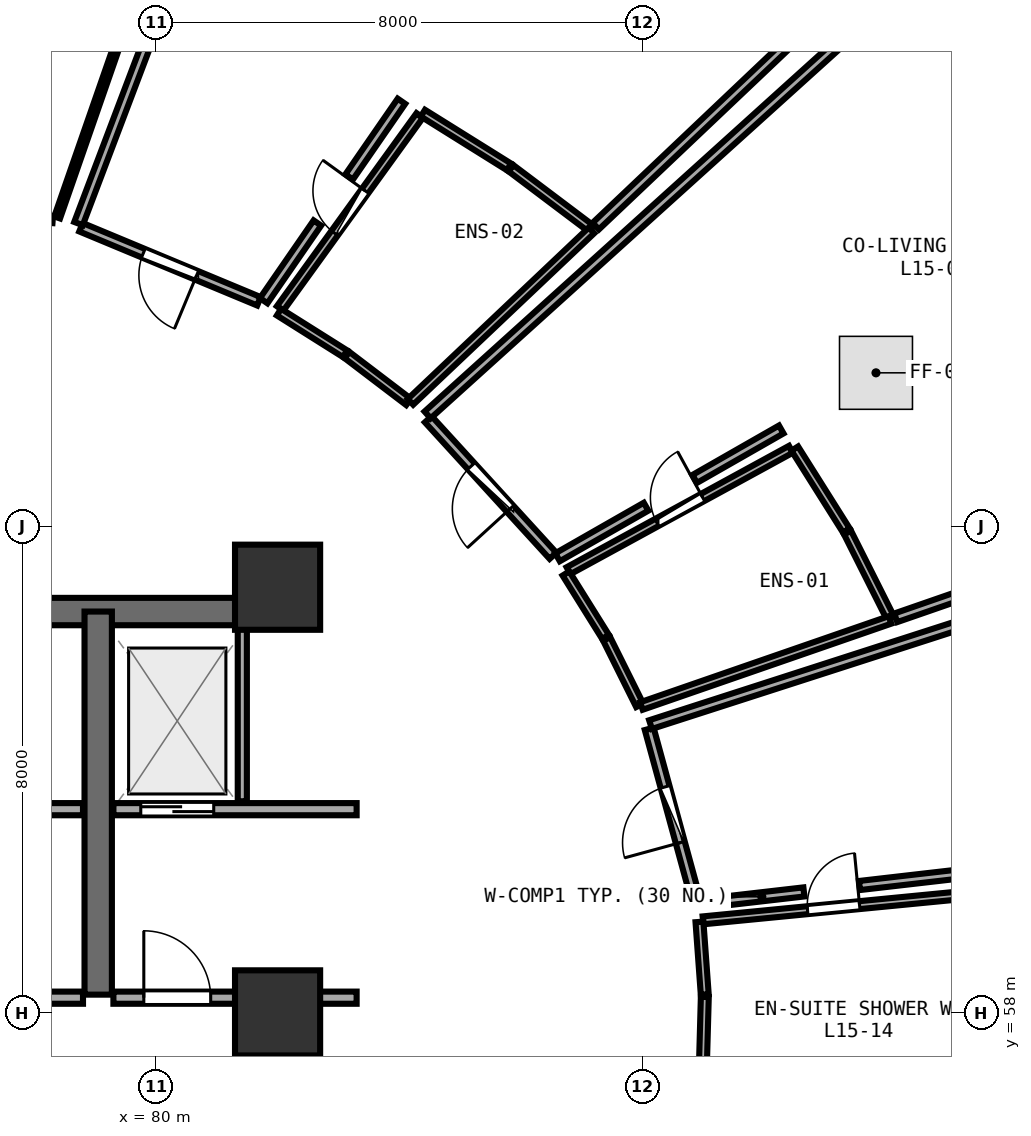
"""IFC4 building model, lengths in metres.
Left out: names, types, materials, properties, quantities, classifications, styles, units other than length and angle.
Written with IfcOpenShell. Run it as: python <this file> out.ifc"""

import sys

from ifc_helpers import new_model, si_unit, direction, frame, frame_2d, origin, origin_2d, place, context, subcontext, project, spatial, rectangle, extrude, element, fill, save


model = new_model("IFC4")
c1 = context("Model", 3, precision=1e-05, world=origin(), true_north=direction((0.0, 1.0)))
c2 = subcontext(c1, "Body", "Model", "MODEL_VIEW")
j1 = project(units=[si_unit("LENGTHUNIT", "METRE"), si_unit("PLANEANGLEUNIT", "RADIAN")], contexts=[c1])
p1 = place(None, origin())
s1 = spatial("IfcSite", under=j1, at=p1, CompositionType="ELEMENT")
p2 = place(p1, origin())
s2 = spatial("IfcBuilding", under=s1, at=p2, CompositionType="ELEMENT")
p3 = place(p2, frame((0.0, 0.0, 60.0)))
s3 = spatial("IfcBuildingStorey", under=s2, at=p3, CompositionType="ELEMENT", Elevation=60.0)
for number, where, z_axis, x_axis in (
    (1, (82.0, 58.0, 0.0), (0.0, 0.0, 1.0), (1.0, 0.0, 0.0)),
    (2, (82.0, 65.0, 0.0), (0.0, 0.0, 1.0), (1.0, 0.0, 0.0)),
):
    element("IfcColumn", number, at=place(p3, frame(where, z_axis=z_axis, x_axis=x_axis)), inside=s3, PredefinedType="PILASTER", context=c2, shape_type="SweptSolid", body=[
        extrude(rectangle(XDim=1.4, YDim=1.4, at=origin_2d()), origin(), (0.0, 0.0, 1.0), 3.75),
    ])
p4 = place(p3, frame((74.0, 64.6, 0.0), z_axis=(0.0, 0.0, 1.0), x_axis=(1.0, 0.0, 0.0)))
e3 = element("IfcWall", 3, at=p4, inside=s3, PredefinedType="SHEAR", context=c2, shape_type="SweptSolid", body=[
    extrude(rectangle(XDim=8.0, YDim=0.45, at=frame_2d((4.0, 0.0))), origin(), (0.0, 0.0, 1.0), 3.49),
])
p5 = place(p3, frame((79.05, 58.3, 0.0), z_axis=(0.0, 0.0, 1.0), x_axis=(0.0, 1.0, 0.0)))
e4 = element("IfcWall", 4, at=p5, inside=s3, PredefinedType="SHEAR", context=c2, shape_type="SweptSolid", body=[
    extrude(rectangle(XDim=6.3, YDim=0.45, at=frame_2d((3.15, 0.0))), origin(), (0.0, 0.0, 1.0), 3.49),
])
p6 = place(p3, frame((74.2, 61.35, 0.0), z_axis=(0.0, 0.0, 1.0), x_axis=(1.0, 0.0, 0.0)))
e5 = element("IfcWall", 5, at=p6, inside=s3, PredefinedType="SOLIDWALL", context=c2, shape_type="SweptSolid", body=[
    extrude(rectangle(XDim=4.6, YDim=0.2, at=frame_2d((2.3, 0.0))), origin(), (0.0, 0.0, 1.0), 3.48),
])
p7 = place(p6, frame((0.52, 0.0, 0.0)))
e6 = element("IfcOpeningElement", 6, at=p7, cuts=e5, PredefinedType="OPENING", context=c2, shape_type="SweptSolid", body=[
    extrude(rectangle(XDim=1.2, YDim=2.15, at=frame_2d((0.6, 1.075))), frame((0.0, 0.11, 0.0), z_axis=(0.0, -1.0, 0.0), x_axis=(1.0, 0.0, 0.0)), (0.0, 0.0, 1.0), 0.22),
])
p8 = place(p3, frame((79.3, 61.35, 0.0), z_axis=(0.0, 0.0, 1.0), x_axis=(1.0, 0.0, 0.0)))
e7 = element("IfcWall", 7, at=p8, inside=s3, PredefinedType="SOLIDWALL", context=c2, shape_type="SweptSolid", body=[
    extrude(rectangle(XDim=4.0, YDim=0.2, at=frame_2d((2.0, 0.0))), origin(), (0.0, 0.0, 1.0), 2.775),
])
p9 = place(p8, frame((0.45, 0.0, 0.0)))
e8 = element("IfcOpeningElement", 8, at=p9, cuts=e7, PredefinedType="OPENING", context=c2, shape_type="SweptSolid", body=[
    extrude(rectangle(XDim=1.2, YDim=2.15, at=frame_2d((0.6, 1.075))), frame((0.0, 0.11, 0.0), z_axis=(0.0, -1.0, 0.0), x_axis=(1.0, 0.0, 0.0)), (0.0, 0.0, 1.0), 0.22),
])
p10 = place(p3, frame((81.42, 61.48, 0.0), z_axis=(0.0, 0.0, 1.0), x_axis=(0.0, 1.0, 0.0)))
e9 = element("IfcWall", 9, at=p10, inside=s3, PredefinedType="PARTITIONING", context=c2, shape_type="SweptSolid", body=[
    extrude(rectangle(XDim=2.84, YDim=0.15, at=frame_2d((1.42, 0.0))), origin(), (0.0, 0.0, 1.0), 3.48),
])
p11 = place(p3, frame((74.2, 58.25, 0.0), z_axis=(0.0, 0.0, 1.0), x_axis=(1.0, 0.0, 0.0)))
e10 = element("IfcWall", 10, at=p11, inside=s3, PredefinedType="SOLIDWALL", context=c2, shape_type="SweptSolid", body=[
    extrude(rectangle(XDim=4.6, YDim=0.2, at=frame_2d((2.3, 0.0))), origin(), (0.0, 0.0, 1.0), 3.48),
])
p12 = place(p11, frame((1.8, 0.0, 0.0)))
e11 = element("IfcOpeningElement", 11, at=p12, cuts=e10, PredefinedType="OPENING", context=c2, shape_type="SweptSolid", body=[
    extrude(rectangle(XDim=1.1, YDim=2.1, at=frame_2d((0.55, 1.05))), frame((0.0, 0.11, 0.0), z_axis=(0.0, -1.0, 0.0), x_axis=(1.0, 0.0, 0.0)), (0.0, 0.0, 1.0), 0.22),
])
p13 = place(p3, frame((79.3, 58.25, 0.0), z_axis=(0.0, 0.0, 1.0), x_axis=(1.0, 0.0, 0.0)))
e12 = element("IfcWall", 12, at=p13, inside=s3, PredefinedType="SOLIDWALL", context=c2, shape_type="SweptSolid", body=[
    extrude(rectangle(XDim=4.0, YDim=0.2, at=frame_2d((2.0, 0.0))), origin(), (0.0, 0.0, 1.0), 2.775),
])
p14 = place(p13, frame((0.5, 0.0, 0.0)))
e13 = element("IfcOpeningElement", 13, at=p14, cuts=e12, PredefinedType="OPENING", context=c2, shape_type="SweptSolid", body=[
    extrude(rectangle(XDim=1.1, YDim=2.1, at=frame_2d((0.55, 1.05))), frame((0.0, 0.11, 0.0), z_axis=(0.0, -1.0, 0.0), x_axis=(1.0, 0.0, 0.0)), (0.0, 0.0, 1.0), 0.22),
])
p15 = place(p3, frame((86.785, 65.272, 0.0), z_axis=(0.0, 0.0, 1.0), x_axis=(0.877747757983, 0.479123025283, 0.0)))
e14 = element("IfcWall", 14, at=p15, inside=s3, PredefinedType="PLUMBINGWALL", context=c2, shape_type="SweptSolid", body=[
    extrude(rectangle(XDim=4.167, YDim=0.13, at=frame_2d((2.083, 0.0))), origin(), (0.0, 0.0, 1.0), 2.875),
])
p16 = place(p15, frame((1.654, 0.0, 0.0)))
e15 = element("IfcOpeningElement", 15, at=p16, cuts=e14, PredefinedType="OPENING", context=c2, shape_type="SweptSolid", body=[
    extrude(rectangle(XDim=0.86, YDim=2.05, at=frame_2d((0.43, 1.025))), frame((0.0, 0.075, 0.0), z_axis=(0.0, -1.0, 0.0), x_axis=(1.0, 0.0, 0.0)), (0.0, 0.0, 1.0), 0.15),
])
p17 = place(p3, frame((86.53, 65.517, 0.0), z_axis=(0.0, 0.0, 1.0), x_axis=(-0.674433052632, 0.738336005839, 0.0)))
e16 = element("IfcWall", 16, at=p17, inside=s3, PredefinedType="PARTITIONING", context=c2, shape_type="SweptSolid", body=[
    extrude(rectangle(XDim=3.041, YDim=0.15, at=frame_2d((1.521, 0.0))), origin(), (0.0, 0.0, 1.0), 2.875),
])
p18 = place(p17, frame((1.046, 0.0, 0.0)))
e17 = element("IfcOpeningElement", 17, at=p18, cuts=e16, PredefinedType="OPENING", context=c2, shape_type="SweptSolid", body=[
    extrude(rectangle(XDim=0.95, YDim=2.08, at=frame_2d((0.475, 1.04))), frame((0.0, 0.085, 0.0), z_axis=(0.0, -1.0, 0.0), x_axis=(1.0, 0.0, 0.0)), (0.0, 0.0, 1.0), 0.17),
])
p19 = place(p3, frame((82.041, 69.583, 0.0), z_axis=(0.0, 0.0, 1.0), x_axis=(0.586113694769, 0.810228817559, 0.0)))
e18 = element("IfcWall", 18, at=p19, inside=s3, PredefinedType="PLUMBINGWALL", context=c2, shape_type="SweptSolid", body=[
    extrude(rectangle(XDim=3.918, YDim=0.13, at=frame_2d((1.959, 0.0))), origin(), (0.0, 0.0, 1.0), 3.235),
])
p20 = place(p19, frame((1.529, 0.0, 0.0)))
e19 = element("IfcOpeningElement", 19, at=p20, cuts=e18, PredefinedType="OPENING", context=c2, shape_type="SweptSolid", body=[
    extrude(rectangle(XDim=0.86, YDim=2.05, at=frame_2d((0.43, 1.025))), frame((0.0, 0.075, 0.0), z_axis=(0.0, -1.0, 0.0), x_axis=(1.0, 0.0, 0.0)), (0.0, 0.0, 1.0), 0.15),
])
p21 = place(p3, frame((81.694, 69.702, 0.0), z_axis=(0.0, 0.0, 1.0), x_axis=(-0.923245473314, 0.384210614124, 0.0)))
e20 = element("IfcWall", 20, at=p21, inside=s3, PredefinedType="PARTITIONING", context=c2, shape_type="SweptSolid", body=[
    extrude(rectangle(XDim=3.169, YDim=0.15, at=frame_2d((1.585, 0.0))), origin(), (0.0, 0.0, 1.0), 2.875),
])
p22 = place(p21, frame((1.11, 0.0, 0.0)))
e21 = element("IfcOpeningElement", 21, at=p22, cuts=e20, PredefinedType="OPENING", context=c2, shape_type="SweptSolid", body=[
    extrude(rectangle(XDim=0.95, YDim=2.08, at=frame_2d((0.475, 1.04))), frame((0.0, 0.085, 0.0), z_axis=(0.0, -1.0, 0.0), x_axis=(1.0, 0.0, 0.0)), (0.0, 0.0, 1.0), 0.17),
])
p23 = place(p3, frame((78.302, 71.048, 0.0), z_axis=(0.0, 0.0, 1.0), x_axis=(-0.997215128993, 0.074578726908, 0.0)))
e22 = element("IfcWall", 22, at=p23, inside=s3, PredefinedType="PARTITIONING", context=c2, shape_type="SweptSolid", body=[
    extrude(rectangle(XDim=6.207, YDim=0.12, at=frame_2d((3.104, 0.0))), origin(), (0.0, 0.0, 1.0), 3.235),
])
p24 = place(p23, frame((2.653, 0.0, 0.0)))
e23 = element("IfcOpeningElement", 23, at=p24, cuts=e22, PredefinedType="OPENING", context=c2, shape_type="SweptSolid", body=[
    extrude(rectangle(XDim=0.9, YDim=2.08, at=frame_2d((0.45, 1.04))), frame((0.0, 0.07, 0.0), z_axis=(0.0, -1.0, 0.0), x_axis=(1.0, 0.0, 0.0)), (0.0, 0.0, 1.0), 0.14),
])
p25 = place(p3, frame((88.997, 59.522, 0.0), z_axis=(0.0, 0.0, 1.0), x_axis=(0.995308448338, 0.096752739847, 0.0)))
e24 = element("IfcWall", 24, at=p25, inside=s3, PredefinedType="PLUMBINGWALL", context=c2, shape_type="SweptSolid", body=[
    extrude(rectangle(XDim=4.315, YDim=0.13, at=frame_2d((2.157, 0.0))), origin(), (0.0, 0.0, 1.0), 3.175),
])
p26 = place(p25, frame((1.727, 0.0, 0.0)))
e25 = element("IfcOpeningElement", 25, at=p26, cuts=e24, PredefinedType="OPENING", context=c2, shape_type="SweptSolid", body=[
    extrude(rectangle(XDim=0.86, YDim=2.05, at=frame_2d((0.43, 1.025))), frame((0.0, 0.075, 0.0), z_axis=(0.0, -1.0, 0.0), x_axis=(1.0, 0.0, 0.0)), (0.0, 0.0, 1.0), 0.15),
])
p27 = place(p3, frame((88.884, 59.845, 0.0), z_axis=(0.0, 0.0, 1.0), x_axis=(-0.263653235341, 0.964617526014, 0.0)))
e26 = element("IfcWall", 26, at=p27, inside=s3, PredefinedType="PARTITIONING", context=c2, shape_type="SweptSolid", body=[
    extrude(rectangle(XDim=2.93, YDim=0.15, at=frame_2d((1.465, 0.0))), origin(), (0.0, 0.0, 1.0), 3.48),
])
p28 = place(p27, frame((0.99, 0.0, 0.0)))
e27 = element("IfcOpeningElement", 27, at=p28, cuts=e26, PredefinedType="OPENING", context=c2, shape_type="SweptSolid", body=[
    extrude(rectangle(XDim=0.95, YDim=2.08, at=frame_2d((0.475, 1.04))), frame((0.0, 0.085, 0.0), z_axis=(0.0, -1.0, 0.0), x_axis=(1.0, 0.0, 0.0)), (0.0, 0.0, 1.0), 0.17),
])
p29 = place(p3, frame((87.956, 63.058, 0.0), z_axis=(0.0, 0.0, 1.0), x_axis=(-0.445610682281, 0.895226853841, 0.0)))
e28 = element("IfcWall", 28, at=p29, inside=s3, PredefinedType="PLUMBINGWALL", context=c2, shape_type="SweptSolid", body=[
    extrude(rectangle(XDim=1.219, YDim=0.13, at=frame_2d((0.609, 0.0))), origin(), (0.0, 0.0, 1.0), 3.48),
])
p30 = place(p3, frame((87.393, 64.184, 0.0), z_axis=(0.0, 0.0, 1.0), x_axis=(-0.5296416079, 0.848221531901, 0.0)))
e29 = element("IfcWall", 29, at=p30, inside=s3, PredefinedType="PLUMBINGWALL", context=c2, shape_type="SweptSolid", body=[
    extrude(rectangle(XDim=1.229, YDim=0.13, at=frame_2d((0.614, 0.0))), origin(), (0.0, 0.0, 1.0), 2.875),
])
p31 = place(p3, frame((90.506, 67.28, 0.0), z_axis=(0.0, 0.0, 1.0), x_axis=(0.533000334155, -0.846115029881, 0.0)))
e30 = element("IfcWall", 30, at=p31, inside=s3, PredefinedType="PLUMBINGWALL", context=c2, shape_type="SweptSolid", body=[
    extrude(rectangle(XDim=1.592, YDim=0.13, at=frame_2d((0.796, 0.0))), origin(), (0.0, 0.0, 1.0), 3.48),
])
p32 = place(p3, frame((91.374, 65.898, 0.0), z_axis=(0.0, 0.0, 1.0), x_axis=(0.448882213202, -0.893590934752, 0.0)))
e31 = element("IfcWall", 31, at=p32, inside=s3, PredefinedType="PLUMBINGWALL", context=c2, shape_type="SweptSolid", body=[
    extrude(rectangle(XDim=1.579, YDim=0.13, at=frame_2d((0.79, 0.0))), origin(), (0.0, 0.0, 1.0), 2.875),
])
p33 = place(p3, frame((92.073, 64.462, 0.0), z_axis=(0.0, 0.0, 1.0), x_axis=(-0.944946491884, -0.327224888228, 0.0)))
e32 = element("IfcWall", 32, at=p33, inside=s3, PredefinedType="PLUMBINGWALL", context=c2, shape_type="SweptSolid", body=[
    extrude(rectangle(XDim=4.327, YDim=0.13, at=frame_2d((2.164, 0.0))), origin(), (0.0, 0.0, 1.0), 3.235),
])
p34 = place(p3, frame((84.468, 67.834, 0.0), z_axis=(0.0, 0.0, 1.0), x_axis=(0.742191353367, 0.670188029577, 0.0)))
e33 = element("IfcWall", 33, at=p34, inside=s3, PredefinedType="PARTITIONING", context=c2, shape_type="SweptSolid", body=[
    extrude(rectangle(XDim=11.569, YDim=0.15, at=frame_2d((5.785, 0.0))), origin(), (0.0, 0.0, 1.0), 2.875),
])
p35 = place(p3, frame((98.992, 66.864, 0.0), z_axis=(0.0, 0.0, 1.0), x_axis=(-0.944826855148, -0.327570166212, 0.0)))
e34 = element("IfcWall", 34, at=p35, inside=s3, PredefinedType="PARTITIONING", context=c2, shape_type="SweptSolid", body=[
    extrude(rectangle(XDim=7.224, YDim=0.15, at=frame_2d((3.612, 0.0))), origin(), (0.0, 0.0, 1.0), 2.875),
])
p36 = place(p3, frame((90.283, 67.594, 0.0), z_axis=(0.0, 0.0, 1.0), x_axis=(-0.868279787631, -0.496074803221, 0.0)))
e35 = element("IfcWall", 35, at=p36, inside=s3, PredefinedType="PARTITIONING", context=c2, shape_type="SweptSolid", body=[
    extrude(rectangle(XDim=1.64, YDim=0.15, at=frame_2d((0.82, 0.0))), origin(), (0.0, 0.0, 1.0), 3.48),
])
p37 = place(p3, frame((88.06, 66.324, 0.0), z_axis=(0.0, 0.0, 1.0), x_axis=(-0.86835963742, -0.495935016004, 0.0)))
e36 = element("IfcWall", 36, at=p37, inside=s3, PredefinedType="PARTITIONING", context=c2, shape_type="SweptSolid", body=[
    extrude(rectangle(XDim=1.676, YDim=0.15, at=frame_2d((0.838, 0.0))), origin(), (0.0, 0.0, 1.0), 2.875),
])
p38 = place(p3, frame((84.155, 68.047, 0.0), z_axis=(0.0, 0.0, 1.0), x_axis=(-0.795884944477, 0.605447896317, 0.0)))
e37 = element("IfcWall", 37, at=p38, inside=s3, PredefinedType="PLUMBINGWALL", context=c2, shape_type="SweptSolid", body=[
    extrude(rectangle(XDim=1.273, YDim=0.13, at=frame_2d((0.636, 0.0))), origin(), (0.0, 0.0, 1.0), 2.875),
])
p39 = place(p3, frame((83.109, 68.841, 0.0), z_axis=(0.0, 0.0, 1.0), x_axis=(-0.846337656307, 0.532646760544, 0.0)))
e38 = element("IfcWall", 38, at=p39, inside=s3, PredefinedType="PLUMBINGWALL", context=c2, shape_type="SweptSolid", body=[
    extrude(rectangle(XDim=1.283, YDim=0.13, at=frame_2d((0.642, 0.0))), origin(), (0.0, 0.0, 1.0), 3.48),
])
p40 = place(p3, frame((84.39, 72.796, 0.0), z_axis=(0.0, 0.0, 1.0), x_axis=(0.848326822388, -0.529472947766, 0.0)))
e39 = element("IfcWall", 39, at=p40, inside=s3, PredefinedType="PLUMBINGWALL", context=c2, shape_type="SweptSolid", body=[
    extrude(rectangle(XDim=1.669, YDim=0.13, at=frame_2d((0.834, 0.0))), origin(), (0.0, 0.0, 1.0), 2.875),
])
p41 = place(p3, frame((85.839, 71.89, 0.0), z_axis=(0.0, 0.0, 1.0), x_axis=(0.798688091321, -0.601745239102, 0.0)))
e40 = element("IfcWall", 40, at=p41, inside=s3, PredefinedType="PLUMBINGWALL", context=c2, shape_type="SweptSolid", body=[
    extrude(rectangle(XDim=1.655, YDim=0.13, at=frame_2d((0.828, 0.0))), origin(), (0.0, 0.0, 1.0), 3.48),
])
p42 = place(p3, frame((87.163, 70.868, 0.0), z_axis=(0.0, 0.0, 1.0), x_axis=(-0.726077844379, -0.687612509996, 0.0)))
e41 = element("IfcWall", 41, at=p42, inside=s3, PredefinedType="PLUMBINGWALL", context=c2, shape_type="SweptSolid", body=[
    extrude(rectangle(XDim=4.1, YDim=0.13, at=frame_2d((2.05, 0.0))), origin(), (0.0, 0.0, 1.0), 3.235),
])
p43 = place(p3, frame((78.726, 70.98, 0.0), z_axis=(0.0, 0.0, 1.0), x_axis=(0.354325845477, 0.935122021571, 0.0)))
e42 = element("IfcWall", 42, at=p43, inside=s3, PredefinedType="PARTITIONING", context=c2, shape_type="SweptSolid", body=[
    extrude(rectangle(XDim=10.938, YDim=0.15, at=frame_2d((5.469, 0.0))), origin(), (0.0, 0.0, 1.0), 2.875),
])
p44 = place(p3, frame((92.567, 75.997, 0.0), z_axis=(0.0, 0.0, 1.0), x_axis=(-0.725622707533, -0.688092789028, 0.0)))
e43 = element("IfcWall", 43, at=p44, inside=s3, PredefinedType="PARTITIONING", context=c2, shape_type="SweptSolid", body=[
    extrude(rectangle(XDim=7.351, YDim=0.15, at=frame_2d((3.675, 0.0))), origin(), (0.0, 0.0, 1.0), 2.875),
])
p45 = place(p3, frame((84.037, 72.992, 0.0), z_axis=(0.0, 0.0, 1.0), x_axis=(-0.568328597461, -0.822801680424, 0.0)))
e44 = element("IfcWall", 44, at=p45, inside=s3, PredefinedType="PARTITIONING", context=c2, shape_type="SweptSolid", body=[
    extrude(rectangle(XDim=1.513, YDim=0.15, at=frame_2d((0.756, 0.0))), origin(), (0.0, 0.0, 1.0), 3.48),
])
p46 = place(p3, frame((82.655, 70.99, 0.0), z_axis=(0.0, 0.0, 1.0), x_axis=(-0.568335150004, -0.822797154389, 0.0)))
e45 = element("IfcWall", 45, at=p46, inside=s3, PredefinedType="PARTITIONING", context=c2, shape_type="SweptSolid", body=[
    extrude(rectangle(XDim=1.553, YDim=0.15, at=frame_2d((0.777, 0.0))), origin(), (0.0, 0.0, 1.0), 3.235),
])
p47 = place(p3, frame((81.962, 81.388, 0.0), z_axis=(0.0, 0.0, 1.0), x_axis=(-0.328662915274, -0.944447292401, 0.0)))
e46 = element("IfcWall", 46, at=p47, inside=s3, PredefinedType="PARTITIONING", context=c2, shape_type="SweptSolid", body=[
    extrude(rectangle(XDim=10.914, YDim=0.1, at=frame_2d((5.457, 0.0))), origin(), (0.0, 0.0, 1.0), 2.875),
])
p48 = place(p3, frame((88.993, 57.066, 0.0), z_axis=(0.0, 0.0, 1.0), x_axis=(0.027750076623, 0.99961489247, 0.0)))
e47 = element("IfcWall", 47, at=p48, inside=s3, PredefinedType="PLUMBINGWALL", context=c2, shape_type="SweptSolid", body=[
    extrude(rectangle(XDim=1.197, YDim=0.13, at=frame_2d((0.598, 0.0))), origin(), (0.0, 0.0, 1.0), 2.875),
])
p49 = place(p3, frame((89.025, 58.302, 0.0), z_axis=(0.0, 0.0, 1.0), x_axis=(-0.072594705052, 0.99736152362, 0.0)))
e48 = element("IfcWall", 48, at=p49, inside=s3, PredefinedType="PLUMBINGWALL", context=c2, shape_type="SweptSolid", body=[
    extrude(rectangle(XDim=1.197, YDim=0.13, at=frame_2d((0.599, 0.0))), origin(), (0.0, 0.0, 1.0), 3.48),
])
p50 = place(p3, frame((88.134, 62.741, 0.0), z_axis=(0.0, 0.0, 1.0), x_axis=(0.951774856366, 0.30679736438, 0.0)))
e49 = element("IfcWall", 49, at=p50, inside=s3, PredefinedType="PARTITIONING", context=c2, shape_type="SweptSolid", body=[
    extrude(rectangle(XDim=11.078, YDim=0.15, at=frame_2d((5.539, 0.0))), origin(), (0.0, 0.0, 1.0), 2.875),
])
p51 = place(p3, frame((93.304, 60.294, 0.0), z_axis=(0.0, 0.0, 1.0), x_axis=(-0.993432194787, -0.114422350794, 0.0)))
e50 = element("IfcWall", 50, at=p51, inside=s3, PredefinedType="PARTITIONING", context=c2, shape_type="SweptSolid", body=[
    extrude(rectangle(XDim=1.745, YDim=0.15, at=frame_2d((0.873, 0.0))), origin(), (0.0, 0.0, 1.0), 3.175),
])
p52 = place(p3, frame((90.656, 59.989, 0.0), z_axis=(0.0, 0.0, 1.0), x_axis=(-0.99343576075, -0.114391386311, 0.0)))
e51 = element("IfcWall", 51, at=p52, inside=s3, PredefinedType="PARTITIONING", context=c2, shape_type="SweptSolid", body=[
    extrude(rectangle(XDim=1.394, YDim=0.15, at=frame_2d((0.697, 0.0))), origin(), (0.0, 0.0, 1.0), 3.48),
])
p53 = place(p9, origin())
e52 = element("IfcDoor", 52, at=p53, inside=s3, OperationType="DOUBLE_DOOR_SLIDING", PredefinedType="DOOR", context=c2, shape_type="SweptSolid", body=[
    extrude(rectangle(XDim=1.2, YDim=2.15, at=frame_2d((0.6, 1.075))), frame((0.0, 0.025, 0.0), z_axis=(0.0, -1.0, 0.0), x_axis=(1.0, 0.0, 0.0)), (0.0, 0.0, 1.0), 0.05),
])
fill(e8, e52)
p54 = place(p14, frame((1.1, 0.0, 0.0), z_axis=(0.0, 0.0, 1.0), x_axis=(-1.0, 0.0, 0.0)))
e53 = element("IfcDoor", 53, at=p54, inside=s3, OperationType="SINGLE_SWING_RIGHT", PredefinedType="DOOR", context=c2, shape_type="SweptSolid", body=[
    extrude(rectangle(XDim=1.1, YDim=2.1, at=frame_2d((0.55, 1.05))), frame((0.0, 0.025, 0.0), z_axis=(0.0, -1.0, 0.0), x_axis=(1.0, 0.0, 0.0)), (0.0, 0.0, 1.0), 0.05),
])
fill(e13, e53)
p55 = place(p16, origin())
e54 = element("IfcDoor", 54, at=p55, inside=s3, OperationType="SINGLE_SWING_RIGHT", PredefinedType="DOOR", context=c2, shape_type="SweptSolid", body=[
    extrude(rectangle(XDim=0.86, YDim=2.05, at=frame_2d((0.43, 1.025))), frame((0.0, 0.025, 0.0), z_axis=(0.0, -1.0, 0.0), x_axis=(1.0, 0.0, 0.0)), (0.0, 0.0, 1.0), 0.05),
])
fill(e15, e54)
p56 = place(p18, origin())
e55 = element("IfcDoor", 55, at=p56, inside=s3, OperationType="SINGLE_SWING_LEFT", PredefinedType="DOOR", context=c2, shape_type="SweptSolid", body=[
    extrude(rectangle(XDim=0.95, YDim=2.08, at=frame_2d((0.475, 1.04))), frame((0.0, 0.025, 0.0), z_axis=(0.0, -1.0, 0.0), x_axis=(1.0, 0.0, 0.0)), (0.0, 0.0, 1.0), 0.05),
])
fill(e17, e55)
p57 = place(p20, origin())
e56 = element("IfcDoor", 56, at=p57, inside=s3, OperationType="SINGLE_SWING_RIGHT", PredefinedType="DOOR", context=c2, shape_type="SweptSolid", body=[
    extrude(rectangle(XDim=0.86, YDim=2.05, at=frame_2d((0.43, 1.025))), frame((0.0, 0.025, 0.0), z_axis=(0.0, -1.0, 0.0), x_axis=(1.0, 0.0, 0.0)), (0.0, 0.0, 1.0), 0.05),
])
fill(e19, e56)
p58 = place(p22, origin())
e57 = element("IfcDoor", 57, at=p58, inside=s3, OperationType="SINGLE_SWING_LEFT", PredefinedType="DOOR", context=c2, shape_type="SweptSolid", body=[
    extrude(rectangle(XDim=0.95, YDim=2.08, at=frame_2d((0.475, 1.04))), frame((0.0, 0.025, 0.0), z_axis=(0.0, -1.0, 0.0), x_axis=(1.0, 0.0, 0.0)), (0.0, 0.0, 1.0), 0.05),
])
fill(e21, e57)
p59 = place(p26, origin())
e58 = element("IfcDoor", 58, at=p59, inside=s3, OperationType="SINGLE_SWING_RIGHT", PredefinedType="DOOR", context=c2, shape_type="SweptSolid", body=[
    extrude(rectangle(XDim=0.86, YDim=2.05, at=frame_2d((0.43, 1.025))), frame((0.0, 0.025, 0.0), z_axis=(0.0, -1.0, 0.0), x_axis=(1.0, 0.0, 0.0)), (0.0, 0.0, 1.0), 0.05),
])
fill(e25, e58)
p60 = place(p28, origin())
e59 = element("IfcDoor", 59, at=p60, inside=s3, OperationType="SINGLE_SWING_LEFT", PredefinedType="DOOR", context=c2, shape_type="SweptSolid", body=[
    extrude(rectangle(XDim=0.95, YDim=2.08, at=frame_2d((0.475, 1.04))), frame((0.0, 0.025, 0.0), z_axis=(0.0, -1.0, 0.0), x_axis=(1.0, 0.0, 0.0)), (0.0, 0.0, 1.0), 0.05),
])
fill(e27, e59)
save(model, sys.argv[1])
